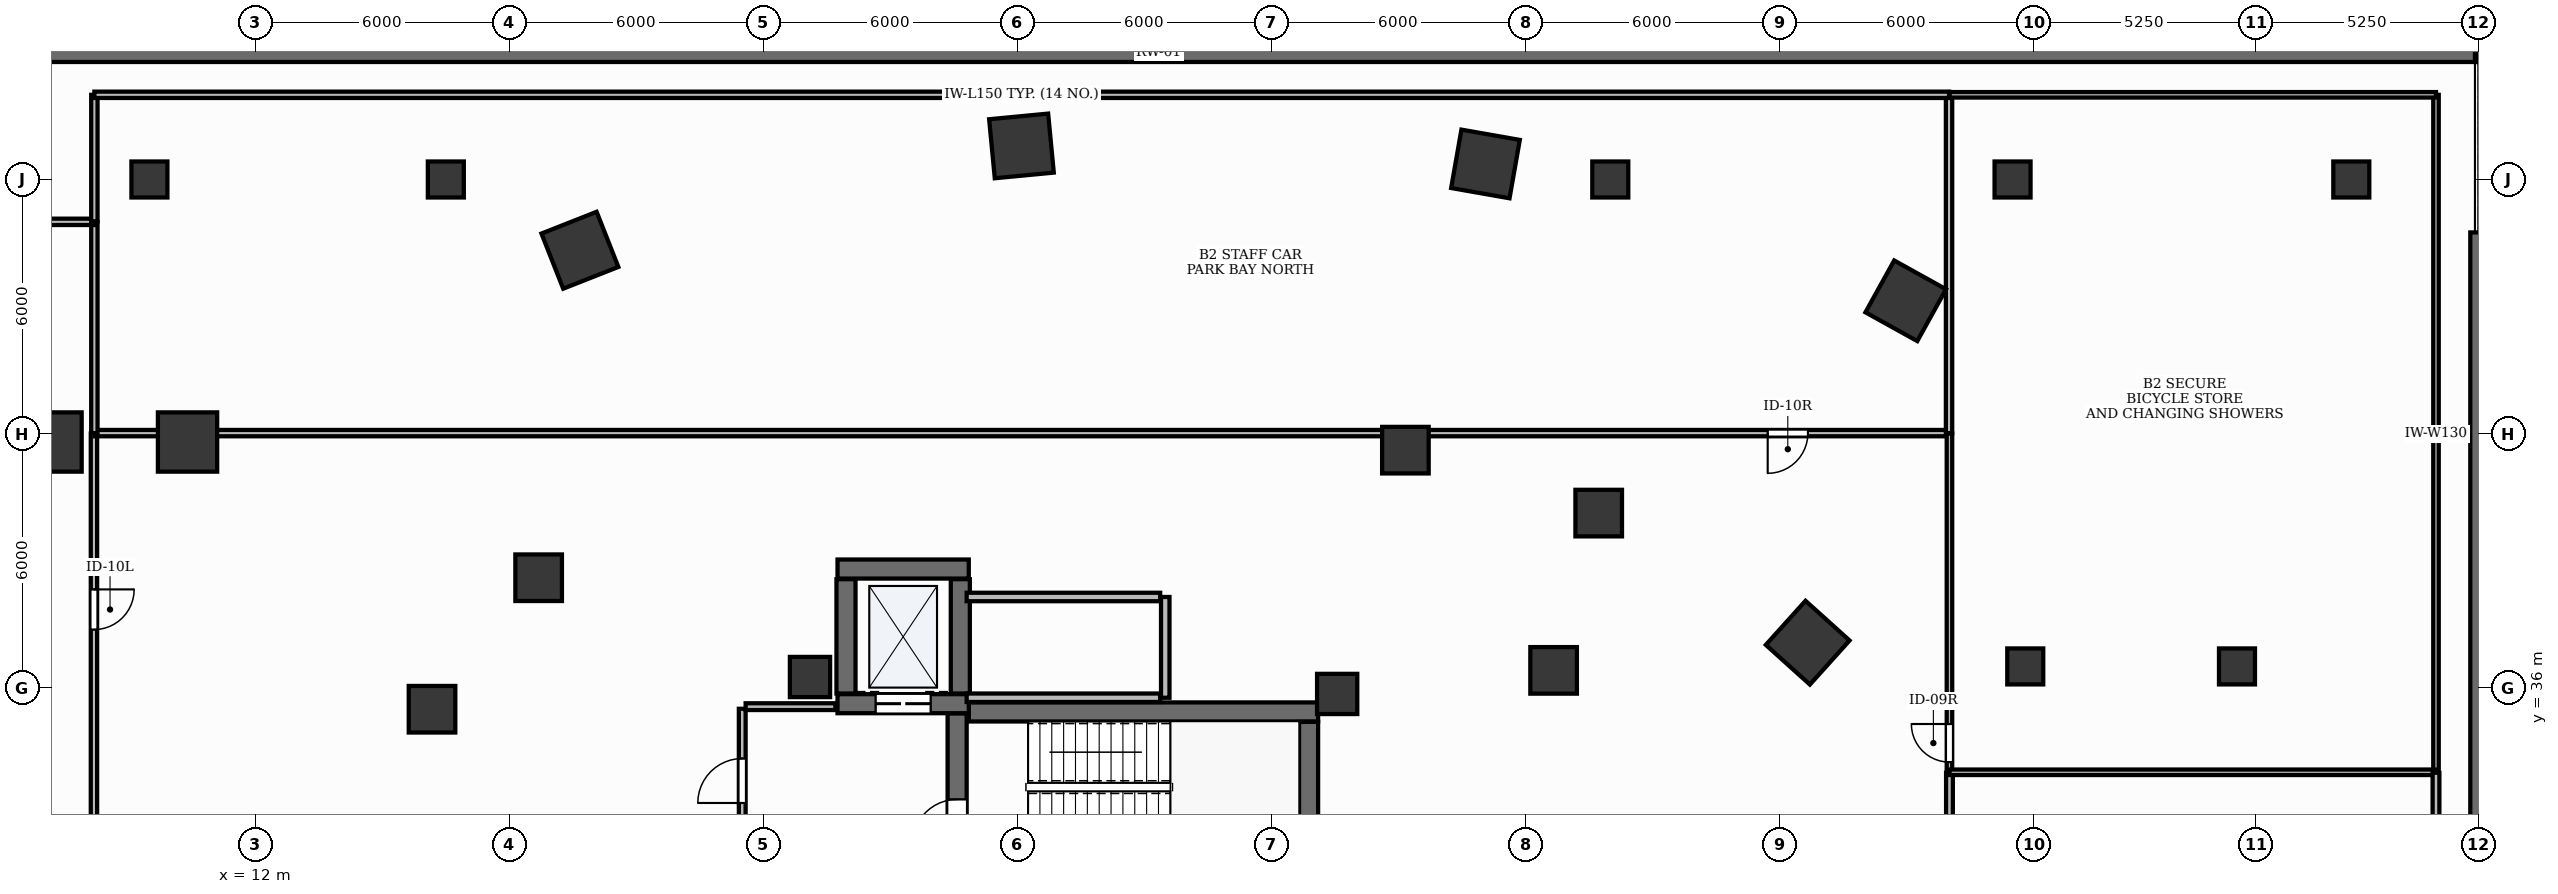
"""IFC4 building model, lengths in metres.
Left out: names, types, materials, properties, quantities, classifications, styles, units other than length and angle.
Written with IfcOpenShell. Run it as: python <this file> out.ifc"""

import sys

from ifc_helpers import new_model, si_unit, direction, frame, frame_2d, origin, origin_2d, place, context, subcontext, project, spatial, rectangle, extrude, element, fill, save


model = new_model("IFC4")
c1 = context("Model", 3, precision=1e-05, world=origin(), true_north=direction((0.0, 1.0)))
c2 = subcontext(c1, "Body", "Model", "MODEL_VIEW")
j1 = project(units=[si_unit("LENGTHUNIT", "METRE"), si_unit("PLANEANGLEUNIT", "RADIAN")], contexts=[c1])
p1 = place(None, origin())
s1 = spatial("IfcSite", under=j1, at=p1, CompositionType="ELEMENT")
p2 = place(p1, origin())
s2 = spatial("IfcBuilding", under=s1, at=p2, CompositionType="ELEMENT")
p3 = place(p2, frame((0.0, 0.0, -9.0)))
s3 = spatial("IfcBuildingStorey", under=s2, at=p3, CompositionType="ELEMENT", Elevation=-9.0)
p4 = place(p3, frame((2.25, 51.0, 0.0), z_axis=(0.0, 0.0, 1.0), x_axis=(1.0, 0.0, 0.0)))
e1 = element("IfcWall", 1, at=p4, inside=s3, PredefinedType="USERDEFINED", context=c2, shape_type="SweptSolid", body=[
    extrude(rectangle(XDim=62.17, YDim=0.45, at=frame_2d((31.085, 0.0))), origin(), (0.0, 0.0, 1.0), 4.18),
])
for number, where, z_axis, x_axis in (
    (2, (9.5, 48.0, 0.0), (0.0, 0.0, 1.0), (1.0, 0.0, 0.0)),
    (3, (16.5, 48.0, 0.0), (0.0, 0.0, 1.0), (1.0, 0.0, 0.0)),
    (4, (44.0, 48.0, 0.0), (0.0, 0.0, 1.0), (1.0, 0.0, 0.0)),
    (5, (53.5, 48.0, 0.0), (0.0, 0.0, 1.0), (1.0, 0.0, 0.0)),
    (6, (61.5, 48.0, 0.0), (0.0, 0.0, 1.0), (1.0, 0.0, 0.0)),
):
    element("IfcColumn", number, at=place(p3, frame(where, z_axis=z_axis, x_axis=x_axis)), inside=s3, PredefinedType="COLUMN", context=c2, shape_type="SweptSolid", body=[
        extrude(rectangle(XDim=0.85, YDim=0.85, at=origin_2d()), origin(), (0.0, 0.0, 1.0), 4.18),
    ])
p5 = place(p3, frame((28.852, 35.425, 0.0), z_axis=(0.0, 0.0, 1.0), x_axis=(1.0, 0.0, 0.0)))
e7 = element("IfcWall", 7, at=p5, inside=s3, PredefinedType="SHEAR", context=c2, shape_type="SweptSolid", body=[
    extrude(rectangle(XDim=8.248, YDim=0.45, at=frame_2d((4.124, 0.0))), origin(), (0.0, 0.0, 1.0), 4.18),
])
p6 = place(p3, frame((36.875, 32.11, 0.0), z_axis=(0.0, 0.0, 1.0), x_axis=(0.0, 1.0, 0.0)))
e8 = element("IfcWall", 8, at=p6, inside=s3, PredefinedType="SHEAR", context=c2, shape_type="SweptSolid", body=[
    extrude(rectangle(XDim=3.08, YDim=0.45, at=frame_2d((1.54, 0.0))), origin(), (0.0, 0.0, 1.0), 4.18),
])
p7 = place(p3, frame((28.575, 32.11, 0.0), z_axis=(0.0, 0.0, 1.0), x_axis=(0.0, 1.0, 0.0)))
e9 = element("IfcWall", 9, at=p7, inside=s3, PredefinedType="SHEAR", context=c2, shape_type="SweptSolid", body=[
    extrude(rectangle(XDim=3.283, YDim=0.45, at=frame_2d((1.642, 0.0))), origin(), (0.0, 0.0, 1.0), 4.18),
])
p8 = place(p7, frame((0.2, 0.0, 0.0)))
e10 = element("IfcOpeningElement", 10, at=p8, cuts=e9, PredefinedType="OPENING", context=c2, shape_type="SweptSolid", body=[
    extrude(rectangle(XDim=1.05, YDim=2.15, at=frame_2d((0.525, 1.075))), frame((0.0, 0.24, 0.0), z_axis=(0.0, -1.0, 0.0), x_axis=(1.0, 0.0, 0.0)), (0.0, 0.0, 1.0), 0.48),
])
p9 = place(p3, frame((25.75, 38.8, 0.0), z_axis=(0.0, 0.0, 1.0), x_axis=(1.0, 0.0, 0.0)))
e11 = element("IfcWall", 11, at=p9, inside=s3, PredefinedType="SHEAR", context=c2, shape_type="SweptSolid", body=[
    extrude(rectangle(XDim=3.1, YDim=0.45, at=frame_2d((1.55, 0.0))), origin(), (0.0, 0.0, 1.0), 4.18),
])
p10 = place(p3, frame((25.75, 35.62, 0.0), z_axis=(0.0, 0.0, 1.0), x_axis=(1.0, 0.0, 0.0)))
e12 = element("IfcWall", 12, at=p10, inside=s3, PredefinedType="SHEAR", context=c2, shape_type="SweptSolid", body=[
    extrude(rectangle(XDim=3.1, YDim=0.45, at=frame_2d((1.55, 0.0))), origin(), (0.0, 0.0, 1.0), 4.18),
])
p11 = place(p10, frame((0.9, 0.0, 0.0)))
e13 = element("IfcOpeningElement", 13, at=p11, cuts=e12, PredefinedType="OPENING", context=c2, shape_type="SweptSolid", body=[
    extrude(rectangle(XDim=1.3, YDim=2.2, at=frame_2d((0.65, 1.1))), frame((0.0, 0.24, 0.0), z_axis=(0.0, -1.0, 0.0), x_axis=(1.0, 0.0, 0.0)), (0.0, 0.0, 1.0), 0.48),
])
for number, where, z_axis, x_axis in (
    (14, (25.95, 35.86, 0.0), (0.0, 0.0, 1.0), (0.0, 1.0, 0.0)),
    (15, (28.65, 35.86, 0.0), (0.0, 0.0, 1.0), (0.0, 1.0, 0.0)),
):
    element("IfcWall", number, at=place(p3, frame(where, z_axis=z_axis, x_axis=x_axis)), inside=s3, PredefinedType="SHEAR", context=c2, shape_type="SweptSolid", body=[
        extrude(rectangle(XDim=2.7, YDim=0.45, at=frame_2d((1.35, 0.0))), origin(), (0.0, 0.0, 1.0), 4.18),
    ])
for number, where, z_axis, x_axis in (
    (16, (37.55, 35.85, 0.0), (0.0, 0.0, 1.0), (1.0, 0.0, 0.0)),
    (17, (25.1, 36.25, 0.0), (0.0, 0.0, 1.0), (1.0, 0.0, 0.0)),
):
    element("IfcColumn", number, at=place(p3, frame(where, z_axis=z_axis, x_axis=x_axis)), inside=s3, PredefinedType="PILASTER", context=c2, shape_type="SweptSolid", body=[
        extrude(rectangle(XDim=0.95, YDim=0.95, at=origin_2d()), origin(), (0.0, 0.0, 1.0), 4.18),
    ])
for number, where, z_axis, x_axis in (
    (18, (7.2, 41.8, 0.0), (0.0, 0.0, 1.0), (1.0, 0.0, 0.0)),
    (19, (10.4, 41.8, 0.0), (0.0, 0.0, 1.0), (1.0, 0.0, 0.0)),
    (20, (50.977, 45.135, 0.0), (0.0, 0.0, 1.0), (-0.875, 0.485, 0.0)),
    (21, (41.052, 48.367, 0.0), (0.0, 0.0, 1.0), (-0.985, 0.173, 0.0)),
    (22, (30.094, 48.792, 0.0), (0.0, 0.0, 1.0), (0.995, 0.095, 0.0)),
    (23, (19.667, 46.329, 0.0), (0.0, 0.0, 1.0), (0.93, 0.367, 0.0)),
    (24, (48.662, 37.061, 0.0), (0.0, 0.0, 1.0), (0.669, 0.743, 0.0)),
):
    element("IfcColumn", number, at=place(p3, frame(where, z_axis=z_axis, x_axis=x_axis)), inside=s3, PredefinedType="COLUMN", context=c2, shape_type="SweptSolid", body=[
        extrude(rectangle(XDim=1.4, YDim=1.4, at=origin_2d()), origin(), (0.0, 0.0, 1.0), 4.18),
    ])
for number, where, z_axis, x_axis in (
    (25, (43.727, 40.121, 0.0), (0.0, 0.0, 1.0), (1.0, 0.0, 0.0)),
    (26, (39.161, 41.608, 0.0), (0.0, 0.0, 1.0), (1.0, 0.0, 0.0)),
    (27, (18.692, 38.595, 0.0), (0.0, 0.0, 1.0), (1.0, 0.0, 0.0)),
    (28, (16.174, 35.489, 0.0), (0.0, 0.0, 1.0), (1.0, 0.0, 0.0)),
    (29, (42.662, 36.407, 0.0), (0.0, 0.0, 1.0), (1.0, 0.0, 0.0)),
):
    element("IfcColumn", number, at=place(p3, frame(where, z_axis=z_axis, x_axis=x_axis)), inside=s3, PredefinedType="COLUMN", context=c2, shape_type="SweptSolid", body=[
        extrude(rectangle(XDim=1.1, YDim=1.1, at=origin_2d()), origin(), (0.0, 0.0, 1.0), 4.18),
    ])
p12 = place(p3, frame((64.5, 10.45, 0.0), z_axis=(0.0, 0.0, 1.0), x_axis=(0.0, 1.0, 0.0)))
e30 = element("IfcWall", 30, at=p12, inside=s3, PredefinedType="SHEAR", context=c2, shape_type="SweptSolid", body=[
    extrude(rectangle(XDim=36.3, YDim=0.38, at=frame_2d((18.15, 0.0))), origin(), (0.0, 0.0, 1.0), 4.18),
])
for number, where, z_axis, x_axis in (
    (31, (58.8, 36.5, 0.0), (0.0, 0.0, 1.0), (1.0, 0.0, 0.0)),
    (32, (53.8, 36.5, 0.0), (0.0, 0.0, 1.0), (1.0, 0.0, 0.0)),
):
    element("IfcColumn", number, at=place(p3, frame(where, z_axis=z_axis, x_axis=x_axis)), inside=s3, PredefinedType="COLUMN", context=c2, shape_type="SweptSolid", body=[
        extrude(rectangle(XDim=0.85, YDim=0.85, at=origin_2d()), origin(), (0.0, 0.0, 1.0), 4.18),
    ])
p13 = place(p3, frame((33.49, 35.76, 0.0), z_axis=(0.0, 0.0, 1.0), x_axis=(0.0, 1.0, 0.0)))
e33 = element("IfcWall", 33, at=p13, inside=s3, PredefinedType="PARTITIONING", context=c2, shape_type="SweptSolid", body=[
    extrude(rectangle(XDim=2.38, YDim=0.2, at=frame_2d((1.19, 0.0))), origin(), (0.0, 0.0, 1.0), 3.04),
])
for number, where, z_axis, x_axis in (
    (34, (28.8, 35.76, 0.0), (0.0, 0.0, 1.0), (1.0, 0.0, 0.0)),
    (35, (28.8, 38.14, 0.0), (0.0, 0.0, 1.0), (1.0, 0.0, 0.0)),
):
    element("IfcWall", number, at=place(p3, frame(where, z_axis=z_axis, x_axis=x_axis)), inside=s3, PredefinedType="PARTITIONING", context=c2, shape_type="SweptSolid", body=[
        extrude(rectangle(XDim=4.57, YDim=0.2, at=frame_2d((2.285, 0.0))), origin(), (0.0, 0.0, 1.0), 3.04),
    ])
p14 = place(p3, frame((23.5, 32.1, 0.0), z_axis=(0.0, 0.0, 1.0), x_axis=(0.0, 1.0, 0.0)))
e36 = element("IfcWall", 36, at=p14, inside=s3, PredefinedType="PARTITIONING", context=c2, shape_type="SweptSolid", body=[
    extrude(rectangle(XDim=3.4, YDim=0.16, at=frame_2d((1.7, 0.0))), origin(), (0.0, 0.0, 1.0), 3.04),
])
p15 = place(p14, frame((1.175, 0.0, 0.0)))
e37 = element("IfcOpeningElement", 37, at=p15, cuts=e36, PredefinedType="OPENING", context=c2, shape_type="SweptSolid", body=[
    extrude(rectangle(XDim=1.05, YDim=2.15, at=frame_2d((0.525, 1.075))), frame((0.0, 0.095, 0.0), z_axis=(0.0, -1.0, 0.0), x_axis=(1.0, 0.0, 0.0)), (0.0, 0.0, 1.0), 0.19),
])
p16 = place(p3, frame((23.58, 35.55, 0.0), z_axis=(0.0, 0.0, 1.0), x_axis=(1.0, 0.0, 0.0)))
e38 = element("IfcWall", 38, at=p16, inside=s3, PredefinedType="PARTITIONING", context=c2, shape_type="SweptSolid", body=[
    extrude(rectangle(XDim=2.12, YDim=0.16, at=frame_2d((1.06, 0.0))), origin(), (0.0, 0.0, 1.0), 3.04),
])
p17 = place(p3, frame((8.19, 42.0, 0.0), z_axis=(0.0, 0.0, 1.0), x_axis=(0.0, -1.0, 0.0)))
e39 = element("IfcWall", 39, at=p17, inside=s3, PredefinedType="PARTITIONING", context=c2, shape_type="SweptSolid", body=[
    extrude(rectangle(XDim=31.0, YDim=0.15, at=frame_2d((15.5, 0.0))), origin(), (0.0, 0.0, 1.0), 3.04),
])
p18 = place(p17, frame((3.681, 0.0, 0.0)))
e40 = element("IfcOpeningElement", 40, at=p18, cuts=e39, PredefinedType="OPENING", context=c2, shape_type="SweptSolid", body=[
    extrude(rectangle(XDim=0.95, YDim=2.15, at=frame_2d((0.475, 1.075))), frame((0.0, 0.09, 0.0), z_axis=(0.0, -1.0, 0.0), x_axis=(1.0, 0.0, 0.0)), (0.0, 0.0, 1.0), 0.18),
])
p19 = place(p3, frame((52.0, 42.01, 0.0), z_axis=(0.0, 0.0, 1.0), x_axis=(-1.0, 0.0, 0.0)))
e41 = element("IfcWall", 41, at=p19, inside=s3, PredefinedType="PARTITIONING", context=c2, shape_type="SweptSolid", body=[
    extrude(rectangle(XDim=43.79, YDim=0.15, at=frame_2d((21.895, 0.0))), origin(), (0.0, 0.0, 1.0), 3.04),
])
p20 = place(p19, frame((3.333, 0.0, 0.0)))
e42 = element("IfcOpeningElement", 42, at=p20, cuts=e41, PredefinedType="OPENING", context=c2, shape_type="SweptSolid", body=[
    extrude(rectangle(XDim=0.95, YDim=2.15, at=frame_2d((0.475, 1.075))), frame((0.0, 0.09, 0.0), z_axis=(0.0, -1.0, 0.0), x_axis=(1.0, 0.0, 0.0)), (0.0, 0.0, 1.0), 0.18),
])
p21 = place(p3, frame((52.01, 34.0, 0.0), z_axis=(0.0, 0.0, 1.0), x_axis=(0.0, 1.0, 0.0)))
e43 = element("IfcWall", 43, at=p21, inside=s3, PredefinedType="PARTITIONING", context=c2, shape_type="SweptSolid", body=[
    extrude(rectangle(XDim=8.0, YDim=0.13, at=frame_2d((4.0, 0.0))), origin(), (0.0, 0.0, 1.0), 3.04),
])
p22 = place(p21, frame((0.24, 0.0, 0.0)))
e44 = element("IfcOpeningElement", 44, at=p22, cuts=e43, PredefinedType="OPENING", context=c2, shape_type="SweptSolid", body=[
    extrude(rectangle(XDim=0.9, YDim=2.15, at=frame_2d((0.45, 1.075))), frame((0.0, 0.08, 0.0), z_axis=(0.0, -1.0, 0.0), x_axis=(1.0, 0.0, 0.0)), (0.0, 0.0, 1.0), 0.16),
])
p23 = place(p3, frame((52.01, 18.0, 0.0), z_axis=(0.0, 0.0, 1.0), x_axis=(0.0, 1.0, 0.0)))
e45 = element("IfcWall", 45, at=p23, inside=s3, PredefinedType="PARTITIONING", context=c2, shape_type="SweptSolid", body=[
    extrude(rectangle(XDim=15.99, YDim=0.16, at=frame_2d((7.995, 0.0))), origin(), (0.0, 0.0, 1.0), 3.04),
])
p24 = place(p23, frame((0.95, 0.0, 0.0)))
e46 = element("IfcOpeningElement", 46, at=p24, cuts=e45, PredefinedType="OPENING", context=c2, shape_type="SweptSolid", body=[
    extrude(rectangle(XDim=0.95, YDim=2.15, at=frame_2d((0.475, 1.075))), frame((0.0, 0.095, 0.0), z_axis=(0.0, -1.0, 0.0), x_axis=(1.0, 0.0, 0.0)), (0.0, 0.0, 1.0), 0.19),
])
p25 = place(p3, frame((8.2, 47.0, 0.0), z_axis=(0.0, 0.0, 1.0), x_axis=(0.0, -1.0, 0.0)))
e47 = element("IfcWall", 47, at=p25, inside=s3, PredefinedType="PARTITIONING", context=c2, shape_type="SweptSolid", body=[
    extrude(rectangle(XDim=4.99, YDim=0.15, at=frame_2d((2.495, 0.0))), origin(), (0.0, 0.0, 1.0), 3.04),
])
p26 = place(p3, frame((3.0, 47.0, 0.0), z_axis=(0.0, 0.0, 1.0), x_axis=(1.0, 0.0, 0.0)))
e48 = element("IfcWall", 48, at=p26, inside=s3, PredefinedType="PARTITIONING", context=c2, shape_type="SweptSolid", body=[
    extrude(rectangle(XDim=5.2, YDim=0.15, at=frame_2d((2.6, 0.0))), origin(), (0.0, 0.0, 1.0), 3.04),
])
p27 = place(p3, frame((52.0, 50.0, 0.0), z_axis=(0.0, 0.0, 1.0), x_axis=(0.0, -1.0, 0.0)))
e49 = element("IfcWall", 49, at=p27, inside=s3, PredefinedType="PARTITIONING", context=c2, shape_type="SweptSolid", body=[
    extrude(rectangle(XDim=7.99, YDim=0.15, at=frame_2d((3.995, 0.0))), origin(), (0.0, 0.0, 1.0), 3.04),
])
p28 = place(p3, frame((8.2, 47.01, 0.0), z_axis=(0.0, 0.0, 1.0), x_axis=(0.0, 1.0, 0.0)))
e50 = element("IfcWall", 50, at=p28, inside=s3, PredefinedType="PARTITIONING", context=c2, shape_type="SweptSolid", body=[
    extrude(rectangle(XDim=2.99, YDim=0.15, at=frame_2d((1.495, 0.0))), origin(), (0.0, 0.0, 1.0), 3.04),
])
p29 = place(p3, frame((8.2, 50.0, 0.0), z_axis=(0.0, 0.0, 1.0), x_axis=(1.0, 0.0, 0.0)))
e51 = element("IfcWall", 51, at=p29, inside=s3, PredefinedType="PARTITIONING", context=c2, shape_type="SweptSolid", body=[
    extrude(rectangle(XDim=43.8, YDim=0.15, at=frame_2d((21.9, 0.0))), origin(), (0.0, 0.0, 1.0), 3.04),
])
p30 = place(p3, frame((63.5, 50.0, 0.0), z_axis=(0.0, 0.0, 1.0), x_axis=(0.0, -1.0, 0.0)))
e52 = element("IfcWall", 52, at=p30, inside=s3, PredefinedType="PARTITIONING", context=c2, shape_type="SweptSolid", body=[
    extrude(rectangle(XDim=16.0, YDim=0.13, at=frame_2d((8.0, 0.0))), origin(), (0.0, 0.0, 1.0), 3.04),
])
for number, where, z_axis, x_axis in (
    (53, (63.5, 34.0, 0.0), (0.0, 0.0, 1.0), (-1.0, 0.0, 0.0)),
    (54, (52.01, 50.0, 0.0), (0.0, 0.0, 1.0), (1.0, 0.0, 0.0)),
):
    element("IfcWall", number, at=place(p3, frame(where, z_axis=z_axis, x_axis=x_axis)), inside=s3, PredefinedType="PARTITIONING", context=c2, shape_type="SweptSolid", body=[
        extrude(rectangle(XDim=11.49, YDim=0.13, at=frame_2d((5.745, 0.0))), origin(), (0.0, 0.0, 1.0), 3.04),
    ])
p31 = place(p3, frame((63.5, 33.99, 0.0), z_axis=(0.0, 0.0, 1.0), x_axis=(0.0, -1.0, 0.0)))
e55 = element("IfcWall", 55, at=p31, inside=s3, PredefinedType="PARTITIONING", context=c2, shape_type="SweptSolid", body=[
    extrude(rectangle(XDim=15.99, YDim=0.16, at=frame_2d((7.995, 0.0))), origin(), (0.0, 0.0, 1.0), 3.04),
])
p32 = place(p8, origin())
e56 = element("IfcDoor", 56, at=p32, inside=s3, OperationType="SINGLE_SWING_LEFT", PredefinedType="DOOR", context=c2, shape_type="SweptSolid", body=[
    extrude(rectangle(XDim=1.05, YDim=2.15, at=frame_2d((0.525, 1.075))), frame((0.0, 0.025, 0.0), z_axis=(0.0, -1.0, 0.0), x_axis=(1.0, 0.0, 0.0)), (0.0, 0.0, 1.0), 0.05),
])
fill(e10, e56)
p33 = place(p11, origin())
e57 = element("IfcDoor", 57, at=p33, inside=s3, OperationType="DOUBLE_DOOR_SLIDING", PredefinedType="DOOR", context=c2, shape_type="SweptSolid", body=[
    extrude(rectangle(XDim=1.3, YDim=2.2, at=frame_2d((0.65, 1.1))), frame((0.0, 0.025, 0.0), z_axis=(0.0, -1.0, 0.0), x_axis=(1.0, 0.0, 0.0)), (0.0, 0.0, 1.0), 0.05),
])
fill(e13, e57)
p34 = place(p15, origin())
e58 = element("IfcDoor", 58, at=p34, inside=s3, OperationType="SINGLE_SWING_LEFT", PredefinedType="DOOR", context=c2, shape_type="SweptSolid", body=[
    extrude(rectangle(XDim=1.05, YDim=2.15, at=frame_2d((0.525, 1.075))), frame((0.0, 0.025, 0.0), z_axis=(0.0, -1.0, 0.0), x_axis=(1.0, 0.0, 0.0)), (0.0, 0.0, 1.0), 0.05),
])
fill(e37, e58)
p35 = place(p18, origin())
e59 = element("IfcDoor", 59, at=p35, inside=s3, OperationType="SINGLE_SWING_LEFT", PredefinedType="DOOR", context=c2, shape_type="SweptSolid", body=[
    extrude(rectangle(XDim=0.95, YDim=2.15, at=frame_2d((0.475, 1.075))), frame((0.0, 0.025, 0.0), z_axis=(0.0, -1.0, 0.0), x_axis=(1.0, 0.0, 0.0)), (0.0, 0.0, 1.0), 0.05),
])
fill(e40, e59)
p36 = place(p20, origin())
e60 = element("IfcDoor", 60, at=p36, inside=s3, OperationType="SINGLE_SWING_RIGHT", PredefinedType="DOOR", context=c2, shape_type="SweptSolid", body=[
    extrude(rectangle(XDim=0.95, YDim=2.15, at=frame_2d((0.475, 1.075))), frame((0.0, 0.025, 0.0), z_axis=(0.0, -1.0, 0.0), x_axis=(1.0, 0.0, 0.0)), (0.0, 0.0, 1.0), 0.05),
])
fill(e42, e60)
p37 = place(p22, origin())
e61 = element("IfcDoor", 61, at=p37, inside=s3, OperationType="SINGLE_SWING_RIGHT", PredefinedType="DOOR", context=c2, shape_type="SweptSolid", body=[
    extrude(rectangle(XDim=0.9, YDim=2.15, at=frame_2d((0.45, 1.075))), frame((0.0, 0.025, 0.0), z_axis=(0.0, -1.0, 0.0), x_axis=(1.0, 0.0, 0.0)), (0.0, 0.0, 1.0), 0.05),
])
fill(e44, e61)
save(model, sys.argv[1])
